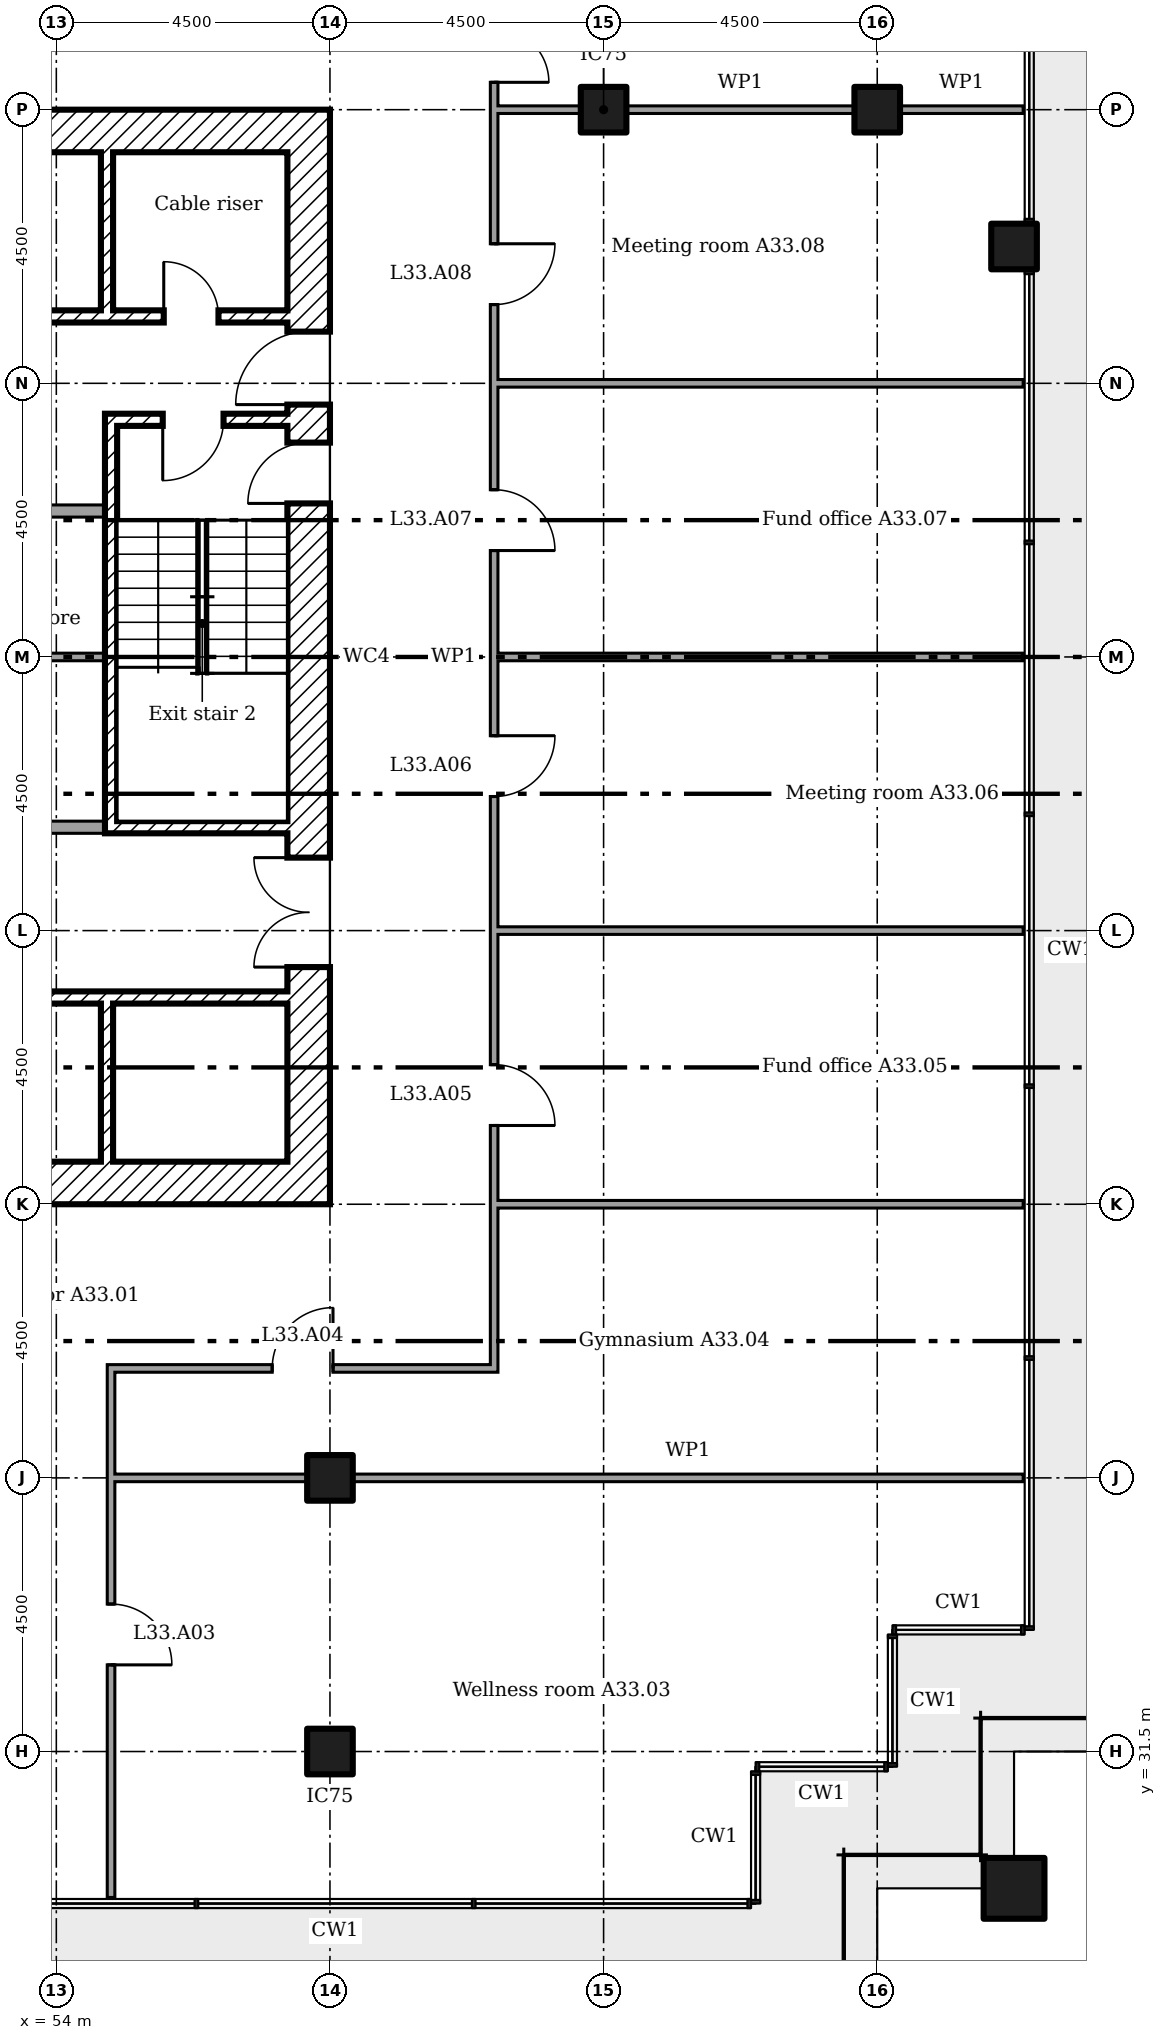
"""IFC4 building model, lengths in metres.
Left out: names, types, materials, properties, quantities, classifications, styles, units other than length and angle.
Written with IfcOpenShell. Run it as: python <this file> out.ifc"""

import sys

from ifc_helpers import new_model, si_unit, direction, frame, frame_2d, origin, origin_2d, place, context, subcontext, project, spatial, rectangle, extrude, element, fill, save


model = new_model("IFC4")
c1 = context("Model", 3, precision=1e-05, world=origin(), true_north=direction((0.0, 1.0)))
c2 = subcontext(c1, "Body", "Model", "MODEL_VIEW")
j1 = project(units=[si_unit("LENGTHUNIT", "METRE"), si_unit("PLANEANGLEUNIT", "RADIAN")], contexts=[c1])
p1 = place(None, origin())
s1 = spatial("IfcSite", under=j1, at=p1, CompositionType="ELEMENT")
p2 = place(p1, origin())
s2 = spatial("IfcBuilding", under=s1, at=p2, CompositionType="ELEMENT")
p3 = place(p2, frame((0.0, 0.0, 135.2)))
s3 = spatial("IfcBuildingStorey", under=s2, at=p3, CompositionType="ELEMENT", Elevation=135.2)
p4 = place(p3, frame((69.75, 29.25, 0.0)))
e1 = element("IfcColumn", 1, at=p4, inside=s3, PredefinedType="COLUMN", context=c2, shape_type="SweptSolid", body=[
    extrude(rectangle(XDim=1.0, YDim=1.0, at=origin_2d()), origin(), (0.0, 0.0, 1.0), 3.6),
])
for number, where in (
    (2, (58.5, 31.5, 0.0)),
    (3, (58.5, 36.0, 0.0)),
    (4, (63.0, 58.5, 0.0)),
    (5, (67.5, 58.5, 0.0)),
    (6, (69.75, 56.25, 0.0)),
):
    element("IfcColumn", number, at=place(p3, frame(where)), inside=s3, PredefinedType="COLUMN", context=c2, shape_type="SweptSolid", body=[
        extrude(rectangle(XDim=0.75, YDim=0.75, at=origin_2d()), origin(), (0.0, 0.0, 1.0), 3.6),
    ])
p5 = place(p3, frame((58.15, 40.5, 0.0), z_axis=(0.0, 0.0, 1.0), x_axis=(0.0, 1.0, 0.0)))
e7 = element("IfcWall", 7, at=p5, inside=s3, PredefinedType="SHEAR", context=c2, shape_type="SweptSolid", body=[
    extrude(rectangle(XDim=18.0, YDim=0.7, at=frame_2d((9.0, 0.0))), origin(), (0.0, 0.0, 1.0), 3.3),
])
p6 = place(p5, frame((13.15, 0.0, 0.0)))
e8 = element("IfcOpeningElement", 8, at=p6, cuts=e7, PredefinedType="OPENING", context=c2, shape_type="SweptSolid", body=[
    extrude(rectangle(XDim=1.2, YDim=2.1, at=frame_2d((0.6, 1.05))), frame((0.0, 0.36, 0.0), z_axis=(0.0, -1.0, 0.0), x_axis=(1.0, 0.0, 0.0)), (0.0, 0.0, 1.0), 0.72),
])
p7 = place(p5, frame((3.9, 0.0, 0.0)))
e9 = element("IfcOpeningElement", 9, at=p7, cuts=e7, PredefinedType="OPENING", context=c2, shape_type="SweptSolid", body=[
    extrude(rectangle(XDim=1.8, YDim=2.1, at=frame_2d((0.9, 1.05))), frame((0.0, 0.36, 0.0), z_axis=(0.0, -1.0, 0.0), x_axis=(1.0, 0.0, 0.0)), (0.0, 0.0, 1.0), 0.72),
])
p8 = place(p5, frame((11.525, 0.0, 0.0)))
e10 = element("IfcOpeningElement", 10, at=p8, cuts=e7, PredefinedType="OPENING", context=c2, shape_type="SweptSolid", body=[
    extrude(rectangle(XDim=1.0, YDim=2.1, at=frame_2d((0.5, 1.05))), frame((0.0, 0.36, 0.0), z_axis=(0.0, -1.0, 0.0), x_axis=(1.0, 0.0, 0.0)), (0.0, 0.0, 1.0), 0.72),
])
for number, where in (
    (11, (41.2, 58.15, 0.0)),
    (12, (41.2, 40.85, 0.0)),
):
    element("IfcWall", number, at=place(p3, frame(where)), inside=s3, PredefinedType="SHEAR", context=c2, shape_type="SweptSolid", body=[
        extrude(rectangle(XDim=16.6, YDim=0.7, at=frame_2d((8.3, 0.0))), origin(), (0.0, 0.0, 1.0), 3.3),
    ])
for number, where, z_axis, x_axis in (
    (13, (54.833, 57.8, 0.0), (0.0, 0.0, 1.0), (0.0, -1.0, 0.0)),
    (14, (54.833, 41.2, 0.0), (0.0, 0.0, 1.0), (0.0, 1.0, 0.0)),
):
    element("IfcWall", number, at=place(p3, frame(where, z_axis=z_axis, x_axis=x_axis)), inside=s3, PredefinedType="SHEAR", context=c2, shape_type="SweptSolid", body=[
        extrude(rectangle(XDim=2.6, YDim=0.2, at=frame_2d((1.3, 0.0))), origin(), (0.0, 0.0, 1.0), 3.3),
    ])
p9 = place(p3, frame((46.933, 55.1, 0.0)))
e15 = element("IfcWall", 15, at=p9, inside=s3, PredefinedType="SHEAR", context=c2, shape_type="SweptSolid", body=[
    extrude(rectangle(XDim=10.867, YDim=0.2, at=frame_2d((5.433, 0.0))), origin(), (0.0, 0.0, 1.0), 3.3),
])
p10 = place(p9, frame((8.833, 0.0, 0.0)))
e16 = element("IfcOpeningElement", 16, at=p10, cuts=e15, PredefinedType="OPENING", context=c2, shape_type="SweptSolid", body=[
    extrude(rectangle(XDim=0.9, YDim=2.1, at=frame_2d((0.45, 1.05))), frame((0.0, 0.11, 0.0), z_axis=(0.0, -1.0, 0.0), x_axis=(1.0, 0.0, 0.0)), (0.0, 0.0, 1.0), 0.22),
])
p11 = place(p3, frame((41.2, 43.9, 0.0)))
e17 = element("IfcWall", 17, at=p11, inside=s3, PredefinedType="SHEAR", context=c2, shape_type="SweptSolid", body=[
    extrude(rectangle(XDim=16.6, YDim=0.2, at=frame_2d((8.3, 0.0))), origin(), (0.0, 0.0, 1.0), 3.3),
])
p12 = place(p11, frame((1.033, 0.0, 0.0)))
e18 = element("IfcOpeningElement", 18, at=p12, cuts=e17, PredefinedType="OPENING", context=c2, shape_type="SweptSolid", body=[
    extrude(rectangle(XDim=1.2, YDim=2.1, at=frame_2d((0.6, 1.05))), frame((0.0, 0.11, 0.0), z_axis=(0.0, -1.0, 0.0), x_axis=(1.0, 0.0, 0.0)), (0.0, 0.0, 1.0), 0.22),
])
p13 = place(p11, frame((3.7, 0.0, 0.0)))
e19 = element("IfcOpeningElement", 19, at=p13, cuts=e17, PredefinedType="OPENING", context=c2, shape_type="SweptSolid", body=[
    extrude(rectangle(XDim=1.2, YDim=2.1, at=frame_2d((0.6, 1.05))), frame((0.0, 0.11, 0.0), z_axis=(0.0, -1.0, 0.0), x_axis=(1.0, 0.0, 0.0)), (0.0, 0.0, 1.0), 0.22),
])
p14 = place(p11, frame((6.367, 0.0, 0.0)))
e20 = element("IfcOpeningElement", 20, at=p14, cuts=e17, PredefinedType="OPENING", context=c2, shape_type="SweptSolid", body=[
    extrude(rectangle(XDim=1.2, YDim=2.1, at=frame_2d((0.6, 1.05))), frame((0.0, 0.11, 0.0), z_axis=(0.0, -1.0, 0.0), x_axis=(1.0, 0.0, 0.0)), (0.0, 0.0, 1.0), 0.22),
])
p15 = place(p11, frame((9.033, 0.0, 0.0)))
e21 = element("IfcOpeningElement", 21, at=p15, cuts=e17, PredefinedType="OPENING", context=c2, shape_type="SweptSolid", body=[
    extrude(rectangle(XDim=1.2, YDim=2.1, at=frame_2d((0.6, 1.05))), frame((0.0, 0.11, 0.0), z_axis=(0.0, -1.0, 0.0), x_axis=(1.0, 0.0, 0.0)), (0.0, 0.0, 1.0), 0.22),
])
p16 = place(p3, frame((54.8, 53.4, 0.0)))
e22 = element("IfcWall", 22, at=p16, inside=s3, PredefinedType="SHEAR", context=c2, shape_type="SweptSolid", body=[
    extrude(rectangle(XDim=3.0, YDim=0.2, at=frame_2d((1.5, 0.0))), origin(), (0.0, 0.0, 1.0), 3.3),
])
p17 = place(p16, frame((0.95, 0.0, 0.0)))
e23 = element("IfcOpeningElement", 23, at=p17, cuts=e22, PredefinedType="OPENING", context=c2, shape_type="SweptSolid", body=[
    extrude(rectangle(XDim=1.0, YDim=2.1, at=frame_2d((0.5, 1.05))), frame((0.0, 0.11, 0.0), z_axis=(0.0, -1.0, 0.0), x_axis=(1.0, 0.0, 0.0)), (0.0, 0.0, 1.0), 0.22),
])
p18 = place(p3, frame((54.8, 46.7, 0.0)))
e24 = element("IfcWall", 24, at=p18, inside=s3, PredefinedType="SHEAR", context=c2, shape_type="SweptSolid", body=[
    extrude(rectangle(XDim=3.0, YDim=0.2, at=frame_2d((1.5, 0.0))), origin(), (0.0, 0.0, 1.0), 3.3),
])
p19 = place(p3, frame((54.9, 46.8, 0.0), z_axis=(0.0, 0.0, 1.0), x_axis=(0.0, 1.0, 0.0)))
e25 = element("IfcWall", 25, at=p19, inside=s3, PredefinedType="SHEAR", context=c2, shape_type="SweptSolid", body=[
    extrude(rectangle(XDim=6.5, YDim=0.2, at=frame_2d((3.25, 0.0))), origin(), (0.0, 0.0, 1.0), 3.3),
])
p20 = place(p3, frame((44.2, 51.9, 0.0)))
e26 = element("IfcWall", 26, at=p20, inside=s3, PredefinedType="PARTITIONING", context=c2, shape_type="SweptSolid", body=[
    extrude(rectangle(XDim=10.6, YDim=0.2, at=frame_2d((5.3, 0.0))), origin(), (0.0, 0.0, 1.0), 3.3),
])
p21 = place(p20, frame((8.5, 0.0, 0.0)))
e27 = element("IfcOpeningElement", 27, at=p21, cuts=e26, PredefinedType="OPENING", context=c2, shape_type="SweptSolid", body=[
    extrude(rectangle(XDim=0.9, YDim=2.1, at=frame_2d((0.45, 1.05))), frame((0.0, 0.11, 0.0), z_axis=(0.0, -1.0, 0.0), x_axis=(1.0, 0.0, 0.0)), (0.0, 0.0, 1.0), 0.22),
])
p22 = place(p3, frame((44.2, 46.7, 0.0)))
e28 = element("IfcWall", 28, at=p22, inside=s3, PredefinedType="PARTITIONING", context=c2, shape_type="SweptSolid", body=[
    extrude(rectangle(XDim=10.6, YDim=0.2, at=frame_2d((5.3, 0.0))), origin(), (0.0, 0.0, 1.0), 3.3),
])
p23 = place(p22, frame((2.0, 0.0, 0.0)))
e29 = element("IfcOpeningElement", 29, at=p23, cuts=e28, PredefinedType="OPENING", context=c2, shape_type="SweptSolid", body=[
    extrude(rectangle(XDim=0.9, YDim=2.1, at=frame_2d((0.45, 1.05))), frame((0.0, 0.11, 0.0), z_axis=(0.0, -1.0, 0.0), x_axis=(1.0, 0.0, 0.0)), (0.0, 0.0, 1.0), 0.22),
])
p24 = place(p22, frame((5.65, 0.0, 0.0)))
e30 = element("IfcOpeningElement", 30, at=p24, cuts=e28, PredefinedType="OPENING", context=c2, shape_type="SweptSolid", body=[
    extrude(rectangle(XDim=0.9, YDim=2.1, at=frame_2d((0.45, 1.05))), frame((0.0, 0.11, 0.0), z_axis=(0.0, -1.0, 0.0), x_axis=(1.0, 0.0, 0.0)), (0.0, 0.0, 1.0), 0.22),
])
p25 = place(p22, frame((8.5, 0.0, 0.0)))
e31 = element("IfcOpeningElement", 31, at=p25, cuts=e28, PredefinedType="OPENING", context=c2, shape_type="SweptSolid", body=[
    extrude(rectangle(XDim=0.9, YDim=2.1, at=frame_2d((0.45, 1.05))), frame((0.0, 0.11, 0.0), z_axis=(0.0, -1.0, 0.0), x_axis=(1.0, 0.0, 0.0)), (0.0, 0.0, 1.0), 0.22),
])
p26 = place(p3, frame((51.562, 49.5, 0.0)))
e32 = element("IfcWall", 32, at=p26, inside=s3, PredefinedType="PARTITIONING", context=c2, shape_type="SweptSolid", body=[
    extrude(rectangle(XDim=3.238, YDim=0.125, at=frame_2d((1.619, 0.0))), origin(), (0.0, 0.0, 1.0), 3.3),
])
p27 = place(p3, frame((54.9, 36.0, 0.0)))
e33 = element("IfcWall", 33, at=p27, inside=s3, PredefinedType="PARTITIONING", context=c2, shape_type="SweptSolid", body=[
    extrude(rectangle(XDim=3.225, YDim=0.125, at=frame_2d((1.613, 0.0))), origin(), (0.0, 0.0, 1.0), 3.4),
])
p28 = place(p3, frame((58.875, 36.0, 0.0)))
e34 = element("IfcWall", 34, at=p28, inside=s3, PredefinedType="PARTITIONING", context=c2, shape_type="SweptSolid", body=[
    extrude(rectangle(XDim=11.025, YDim=0.125, at=frame_2d((5.512, 0.0))), origin(), (0.0, 0.0, 1.0), 2.626),
])
p29 = place(p3, frame((54.837, 37.8, 0.0)))
e35 = element("IfcWall", 35, at=p29, inside=s3, PredefinedType="PARTITIONING", context=c2, shape_type="SweptSolid", body=[
    extrude(rectangle(XDim=6.425, YDim=0.125, at=frame_2d((3.212, 0.0))), origin(), (0.0, 0.0, 1.0), 3.4),
])
p30 = place(p29, frame((2.712, 0.0, 0.0)))
e36 = element("IfcOpeningElement", 36, at=p30, cuts=e35, PredefinedType="OPENING", context=c2, shape_type="SweptSolid", body=[
    extrude(rectangle(XDim=1.0, YDim=2.1, at=frame_2d((0.5, 1.05))), frame((0.0, 0.073, 0.0), z_axis=(0.0, -1.0, 0.0), x_axis=(1.0, 0.0, 0.0)), (0.0, 0.0, 1.0), 0.145),
])
for number, where in (
    (37, (61.2, 40.5, 0.0)),
    (38, (61.2, 45.0, 0.0)),
    (39, (61.2, 49.5, 0.0)),
    (40, (61.2, 54.0, 0.0)),
):
    element("IfcWall", number, at=place(p3, frame(where)), inside=s3, PredefinedType="PARTITIONING", context=c2, shape_type="SweptSolid", body=[
        extrude(rectangle(XDim=8.7, YDim=0.125, at=frame_2d((4.35, 0.0))), origin(), (0.0, 0.0, 1.0), 2.626),
    ])
p31 = place(p3, frame((61.2, 58.5, 0.0)))
e41 = element("IfcWall", 41, at=p31, inside=s3, PredefinedType="PARTITIONING", context=c2, shape_type="SweptSolid", body=[
    extrude(rectangle(XDim=1.425, YDim=0.125, at=frame_2d((0.712, 0.0))), origin(), (0.0, 0.0, 1.0), 2.457),
])
p32 = place(p3, frame((63.375, 58.5, 0.0)))
e42 = element("IfcWall", 42, at=p32, inside=s3, PredefinedType="PARTITIONING", context=c2, shape_type="SweptSolid", body=[
    extrude(rectangle(XDim=3.75, YDim=0.125, at=frame_2d((1.875, 0.0))), origin(), (0.0, 0.0, 1.0), 2.457),
])
p33 = place(p3, frame((67.875, 58.5, 0.0)))
e43 = element("IfcWall", 43, at=p33, inside=s3, PredefinedType="PARTITIONING", context=c2, shape_type="SweptSolid", body=[
    extrude(rectangle(XDim=2.025, YDim=0.125, at=frame_2d((1.012, 0.0))), origin(), (0.0, 0.0, 1.0), 2.457),
])
p34 = place(p3, frame((54.9, 29.1, 0.0), z_axis=(0.0, 0.0, 1.0), x_axis=(0.0, 1.0, 0.0)))
e44 = element("IfcWall", 44, at=p34, inside=s3, PredefinedType="PARTITIONING", context=c2, shape_type="SweptSolid", body=[
    extrude(rectangle(XDim=8.637, YDim=0.125, at=frame_2d((4.319, 0.0))), origin(), (0.0, 0.0, 1.0), 3.4),
])
p35 = place(p34, frame((3.825, 0.0, 0.0)))
e45 = element("IfcOpeningElement", 45, at=p35, cuts=e44, PredefinedType="OPENING", context=c2, shape_type="SweptSolid", body=[
    extrude(rectangle(XDim=1.0, YDim=2.1, at=frame_2d((0.5, 1.05))), frame((0.0, 0.073, 0.0), z_axis=(0.0, -1.0, 0.0), x_axis=(1.0, 0.0, 0.0)), (0.0, 0.0, 1.0), 0.145),
])
p36 = place(p3, frame((61.2, 37.863, 0.0), z_axis=(0.0, 0.0, 1.0), x_axis=(0.0, 1.0, 0.0)))
e46 = element("IfcWall", 46, at=p36, inside=s3, PredefinedType="PARTITIONING", context=c2, shape_type="SweptSolid", body=[
    extrude(rectangle(XDim=23.275, YDim=0.125, at=frame_2d((11.637, 0.0))), origin(), (0.0, 0.0, 1.0), 3.4),
])
p37 = place(p36, frame((3.933, 0.0, 0.0)))
e47 = element("IfcOpeningElement", 47, at=p37, cuts=e46, PredefinedType="OPENING", context=c2, shape_type="SweptSolid", body=[
    extrude(rectangle(XDim=1.0, YDim=2.1, at=frame_2d((0.5, 1.05))), frame((0.0, 0.073, 0.0), z_axis=(0.0, -1.0, 0.0), x_axis=(1.0, 0.0, 0.0)), (0.0, 0.0, 1.0), 0.145),
])
p38 = place(p36, frame((9.343, 0.0, 0.0)))
e48 = element("IfcOpeningElement", 48, at=p38, cuts=e46, PredefinedType="OPENING", context=c2, shape_type="SweptSolid", body=[
    extrude(rectangle(XDim=1.0, YDim=2.1, at=frame_2d((0.5, 1.05))), frame((0.0, 0.073, 0.0), z_axis=(0.0, -1.0, 0.0), x_axis=(1.0, 0.0, 0.0)), (0.0, 0.0, 1.0), 0.145),
])
p39 = place(p36, frame((13.387, 0.0, 0.0)))
e49 = element("IfcOpeningElement", 49, at=p39, cuts=e46, PredefinedType="OPENING", context=c2, shape_type="SweptSolid", body=[
    extrude(rectangle(XDim=1.0, YDim=2.1, at=frame_2d((0.5, 1.05))), frame((0.0, 0.073, 0.0), z_axis=(0.0, -1.0, 0.0), x_axis=(1.0, 0.0, 0.0)), (0.0, 0.0, 1.0), 0.145),
])
p40 = place(p36, frame((17.433, 0.0, 0.0)))
e50 = element("IfcOpeningElement", 50, at=p40, cuts=e46, PredefinedType="OPENING", context=c2, shape_type="SweptSolid", body=[
    extrude(rectangle(XDim=1.0, YDim=2.1, at=frame_2d((0.5, 1.05))), frame((0.0, 0.073, 0.0), z_axis=(0.0, -1.0, 0.0), x_axis=(1.0, 0.0, 0.0)), (0.0, 0.0, 1.0), 0.145),
])
p41 = place(p36, frame((21.087, 0.0, 0.0)))
e51 = element("IfcOpeningElement", 51, at=p41, cuts=e46, PredefinedType="OPENING", context=c2, shape_type="SweptSolid", body=[
    extrude(rectangle(XDim=1.8, YDim=2.1, at=frame_2d((0.9, 1.05))), frame((0.0, 0.073, 0.0), z_axis=(0.0, -1.0, 0.0), x_axis=(1.0, 0.0, 0.0)), (0.0, 0.0, 1.0), 0.145),
])
p42 = place(p6, origin())
e52 = element("IfcDoor", 52, at=p42, inside=s3, OperationType="SINGLE_SWING_RIGHT", PredefinedType="DOOR", context=c2, shape_type="SweptSolid", body=[
    extrude(rectangle(XDim=1.2, YDim=2.1, at=frame_2d((0.6, 1.05))), frame((0.0, 0.025, 0.0), z_axis=(0.0, -1.0, 0.0), x_axis=(1.0, 0.0, 0.0)), (0.0, 0.0, 1.0), 0.05),
])
fill(e8, e52)
p43 = place(p7, origin())
e53 = element("IfcDoor", 53, at=p43, inside=s3, OperationType="DOUBLE_DOOR_SINGLE_SWING", PredefinedType="DOOR", context=c2, shape_type="SweptSolid", body=[
    extrude(rectangle(XDim=1.8, YDim=2.1, at=frame_2d((0.9, 1.05))), frame((0.0, 0.025, 0.0), z_axis=(0.0, -1.0, 0.0), x_axis=(1.0, 0.0, 0.0)), (0.0, 0.0, 1.0), 0.05),
])
fill(e9, e53)
p44 = place(p17, frame((1.0, 0.0, 0.0), x_axis=(-1.0, 0.0, 0.0)))
e54 = element("IfcDoor", 54, at=p44, inside=s3, OperationType="SINGLE_SWING_LEFT", PredefinedType="DOOR", context=c2, shape_type="SweptSolid", body=[
    extrude(rectangle(XDim=1.0, YDim=2.1, at=frame_2d((0.5, 1.05))), frame((0.0, 0.025, 0.0), z_axis=(0.0, -1.0, 0.0), x_axis=(1.0, 0.0, 0.0)), (0.0, 0.0, 1.0), 0.05),
])
fill(e23, e54)
p45 = place(p8, origin())
e55 = element("IfcDoor", 55, at=p45, inside=s3, OperationType="SINGLE_SWING_RIGHT", PredefinedType="DOOR", context=c2, shape_type="SweptSolid", body=[
    extrude(rectangle(XDim=1.0, YDim=2.1, at=frame_2d((0.5, 1.05))), frame((0.0, 0.025, 0.0), z_axis=(0.0, -1.0, 0.0), x_axis=(1.0, 0.0, 0.0)), (0.0, 0.0, 1.0), 0.05),
])
fill(e10, e55)
p46 = place(p10, origin())
e56 = element("IfcDoor", 56, at=p46, inside=s3, OperationType="SINGLE_SWING_RIGHT", PredefinedType="DOOR", context=c2, shape_type="SweptSolid", body=[
    extrude(rectangle(XDim=0.9, YDim=2.1, at=frame_2d((0.45, 1.05))), frame((0.0, 0.025, 0.0), z_axis=(0.0, -1.0, 0.0), x_axis=(1.0, 0.0, 0.0)), (0.0, 0.0, 1.0), 0.05),
])
fill(e16, e56)
p47 = place(p35, frame((1.0, 0.0, 0.0), x_axis=(-1.0, 0.0, 0.0)))
e57 = element("IfcDoor", 57, at=p47, inside=s3, OperationType="SINGLE_SWING_LEFT", PredefinedType="DOOR", context=c2, shape_type="SweptSolid", body=[
    extrude(rectangle(XDim=1.0, YDim=2.1, at=frame_2d((0.5, 1.05))), frame((0.0, 0.025, 0.0), z_axis=(0.0, -1.0, 0.0), x_axis=(1.0, 0.0, 0.0)), (0.0, 0.0, 1.0), 0.05),
])
fill(e45, e57)
p48 = place(p30, origin())
e58 = element("IfcDoor", 58, at=p48, inside=s3, OperationType="SINGLE_SWING_LEFT", PredefinedType="DOOR", context=c2, shape_type="SweptSolid", body=[
    extrude(rectangle(XDim=1.0, YDim=2.1, at=frame_2d((0.5, 1.05))), frame((0.0, 0.025, 0.0), z_axis=(0.0, -1.0, 0.0), x_axis=(1.0, 0.0, 0.0)), (0.0, 0.0, 1.0), 0.05),
])
fill(e36, e58)
p49 = place(p37, frame((1.0, 0.0, 0.0), x_axis=(-1.0, 0.0, 0.0)))
e59 = element("IfcDoor", 59, at=p49, inside=s3, OperationType="SINGLE_SWING_LEFT", PredefinedType="DOOR", context=c2, shape_type="SweptSolid", body=[
    extrude(rectangle(XDim=1.0, YDim=2.1, at=frame_2d((0.5, 1.05))), frame((0.0, 0.025, 0.0), z_axis=(0.0, -1.0, 0.0), x_axis=(1.0, 0.0, 0.0)), (0.0, 0.0, 1.0), 0.05),
])
fill(e47, e59)
p50 = place(p38, frame((1.0, 0.0, 0.0), x_axis=(-1.0, 0.0, 0.0)))
e60 = element("IfcDoor", 60, at=p50, inside=s3, OperationType="SINGLE_SWING_RIGHT", PredefinedType="DOOR", context=c2, shape_type="SweptSolid", body=[
    extrude(rectangle(XDim=1.0, YDim=2.1, at=frame_2d((0.5, 1.05))), frame((0.0, 0.025, 0.0), z_axis=(0.0, -1.0, 0.0), x_axis=(1.0, 0.0, 0.0)), (0.0, 0.0, 1.0), 0.05),
])
fill(e48, e60)
p51 = place(p39, frame((1.0, 0.0, 0.0), x_axis=(-1.0, 0.0, 0.0)))
e61 = element("IfcDoor", 61, at=p51, inside=s3, OperationType="SINGLE_SWING_LEFT", PredefinedType="DOOR", context=c2, shape_type="SweptSolid", body=[
    extrude(rectangle(XDim=1.0, YDim=2.1, at=frame_2d((0.5, 1.05))), frame((0.0, 0.025, 0.0), z_axis=(0.0, -1.0, 0.0), x_axis=(1.0, 0.0, 0.0)), (0.0, 0.0, 1.0), 0.05),
])
fill(e49, e61)
p52 = place(p40, frame((1.0, 0.0, 0.0), x_axis=(-1.0, 0.0, 0.0)))
e62 = element("IfcDoor", 62, at=p52, inside=s3, OperationType="SINGLE_SWING_RIGHT", PredefinedType="DOOR", context=c2, shape_type="SweptSolid", body=[
    extrude(rectangle(XDim=1.0, YDim=2.1, at=frame_2d((0.5, 1.05))), frame((0.0, 0.025, 0.0), z_axis=(0.0, -1.0, 0.0), x_axis=(1.0, 0.0, 0.0)), (0.0, 0.0, 1.0), 0.05),
])
fill(e50, e62)
p53 = place(p41, frame((1.8, 0.0, 0.0), x_axis=(-1.0, 0.0, 0.0)))
e63 = element("IfcDoor", 63, at=p53, inside=s3, OperationType="DOUBLE_DOOR_SINGLE_SWING", PredefinedType="DOOR", context=c2, shape_type="SweptSolid", body=[
    extrude(rectangle(XDim=1.8, YDim=2.1, at=frame_2d((0.9, 1.05))), frame((0.0, 0.025, 0.0), z_axis=(0.0, -1.0, 0.0), x_axis=(1.0, 0.0, 0.0)), (0.0, 0.0, 1.0), 0.05),
])
fill(e51, e63)
save(model, sys.argv[1])
